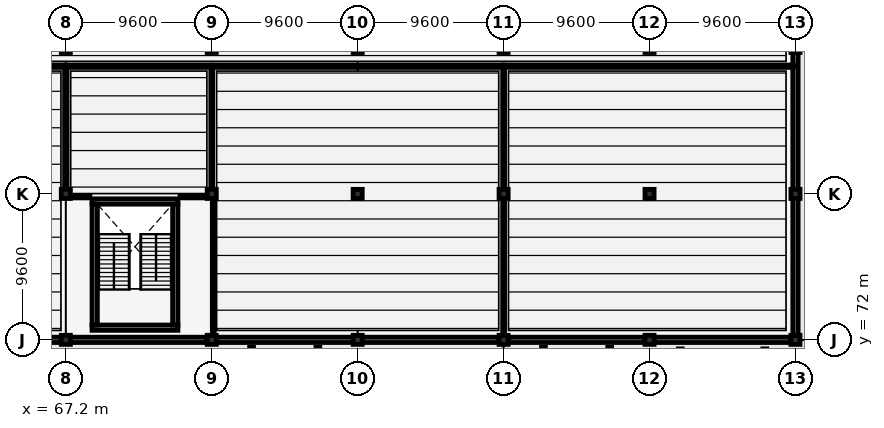
"""IFC4 building model, lengths in metres.
Left out: names, types, materials, properties, quantities, classifications, styles, units other than length and angle.
Written with IfcOpenShell. Run it as: python <this file> out.ifc"""

import sys

from ifc_helpers import new_model, si_unit, direction, frame, frame_2d, origin, origin_2d, place, context, subcontext, project, spatial, rectangle, hollow_rectangle, extrude, element, fill, save


model = new_model("IFC4")
c1 = context("Model", 3, precision=1e-05, world=origin(), true_north=direction((0.0, 1.0)))
c2 = subcontext(c1, "Body", "Model", "MODEL_VIEW")
j1 = project(units=[si_unit("LENGTHUNIT", "METRE"), si_unit("PLANEANGLEUNIT", "RADIAN")], contexts=[c1])
p1 = place(None, origin())
s1 = spatial("IfcSite", under=j1, at=p1, CompositionType="ELEMENT")
p2 = place(p1, origin())
s2 = spatial("IfcBuilding", under=s1, at=p2, CompositionType="ELEMENT")
p3 = place(p2, origin())
s3 = spatial("IfcBuildingStorey", under=s2, at=p3, CompositionType="ELEMENT", Elevation=0.0)
for number, where, z_axis, x_axis in (
    (1, (67.2, 72.0, 0.0), (0.0, 0.0, 1.0), (1.0, 0.0, 0.0)),
    (2, (67.2, 81.6, 0.0), (0.0, 0.0, 1.0), (1.0, 0.0, 0.0)),
    (3, (76.8, 72.0, 0.0), (0.0, 0.0, 1.0), (1.0, 0.0, 0.0)),
    (4, (76.8, 81.6, 0.0), (0.0, 0.0, 1.0), (1.0, 0.0, 0.0)),
    (5, (86.4, 72.0, 0.0), (0.0, 0.0, 1.0), (1.0, 0.0, 0.0)),
    (6, (86.4, 81.6, 0.0), (0.0, 0.0, 1.0), (1.0, 0.0, 0.0)),
    (7, (96.0, 72.0, 0.0), (0.0, 0.0, 1.0), (1.0, 0.0, 0.0)),
    (8, (96.0, 81.6, 0.0), (0.0, 0.0, 1.0), (1.0, 0.0, 0.0)),
    (9, (105.6, 72.0, 0.0), (0.0, 0.0, 1.0), (1.0, 0.0, 0.0)),
    (10, (105.6, 81.6, 0.0), (0.0, 0.0, 1.0), (1.0, 0.0, 0.0)),
    (11, (115.2, 72.0, 0.0), (0.0, 0.0, 1.0), (1.0, 0.0, 0.0)),
    (12, (115.2, 81.6, 0.0), (0.0, 0.0, 1.0), (1.0, 0.0, 0.0)),
):
    element("IfcColumn", number, at=place(p3, frame(where, z_axis=z_axis, x_axis=x_axis)), inside=s3, PredefinedType="COLUMN", context=c2, shape_type="SweptSolid", body=[
        extrude(rectangle(XDim=0.6, YDim=0.6, at=origin_2d()), origin(), (0.0, 0.0, 1.0), 4.8),
    ])
p4 = place(p3, frame((57.9, 72.0, 0.0), z_axis=(0.0, 0.0, 1.0), x_axis=(1.0, 0.0, 0.0)))
e13 = element("IfcWall", 13, at=p4, inside=s3, PredefinedType="SOLIDWALL", context=c2, shape_type="SweptSolid", body=[
    extrude(rectangle(XDim=9.0, YDim=0.35, at=frame_2d((4.5, 0.0))), origin(), (0.0, 0.0, 1.0), 4.1),
])
p5 = place(p4, frame((5.4, 0.0, 1.1)))
e14 = element("IfcOpeningElement", 14, at=p5, cuts=e13, PredefinedType="OPENING", context=c2, shape_type="SweptSolid", body=[
    extrude(rectangle(XDim=1.46, YDim=1.57, at=frame_2d((0.73, 0.785))), frame((0.0, 0.185, 0.0), z_axis=(0.0, -1.0, 0.0), x_axis=(1.0, 0.0, 0.0)), (0.0, 0.0, 1.0), 0.37),
])
p6 = place(p3, frame((67.5, 72.0, 0.0), z_axis=(0.0, 0.0, 1.0), x_axis=(1.0, 0.0, 0.0)))
e15 = element("IfcWall", 15, at=p6, inside=s3, PredefinedType="SOLIDWALL", context=c2, shape_type="SweptSolid", body=[
    extrude(rectangle(XDim=9.0, YDim=0.35, at=frame_2d((4.5, 0.0))), origin(), (0.0, 0.0, 1.0), 4.1),
])
p7 = place(p6, frame((1.4, 0.0, 0.0)))
e16 = element("IfcOpeningElement", 16, at=p7, cuts=e15, PredefinedType="OPENING", context=c2, shape_type="SweptSolid", body=[
    extrude(rectangle(XDim=1.92, YDim=2.34, at=frame_2d((0.96, 1.17))), frame((0.0, 0.185, 0.0), z_axis=(0.0, -1.0, 0.0), x_axis=(1.0, 0.0, 0.0)), (0.0, 0.0, 1.0), 0.37),
])
p8 = place(p6, frame((5.4, 0.0, 1.1)))
e17 = element("IfcOpeningElement", 17, at=p8, cuts=e15, PredefinedType="OPENING", context=c2, shape_type="SweptSolid", body=[
    extrude(rectangle(XDim=1.38, YDim=1.51, at=frame_2d((0.69, 0.755))), frame((0.0, 0.185, 0.0), z_axis=(0.0, -1.0, 0.0), x_axis=(1.0, 0.0, 0.0)), (0.0, 0.0, 1.0), 0.37),
])
p9 = place(p3, frame((77.1, 72.0, 0.0), z_axis=(0.0, 0.0, 1.0), x_axis=(1.0, 0.0, 0.0)))
e18 = element("IfcWall", 18, at=p9, inside=s3, PredefinedType="SOLIDWALL", context=c2, shape_type="SweptSolid", body=[
    extrude(rectangle(XDim=9.0, YDim=0.35, at=frame_2d((4.5, 0.0))), origin(), (0.0, 0.0, 1.0), 4.1),
])
p10 = place(p9, frame((5.4, 0.0, 1.1)))
e19 = element("IfcOpeningElement", 19, at=p10, cuts=e18, PredefinedType="OPENING", context=c2, shape_type="SweptSolid", body=[
    extrude(rectangle(XDim=1.46, YDim=1.57, at=frame_2d((0.73, 0.785))), frame((0.0, 0.185, 0.0), z_axis=(0.0, -1.0, 0.0), x_axis=(1.0, 0.0, 0.0)), (0.0, 0.0, 1.0), 0.37),
])
p11 = place(p3, frame((86.7, 72.0, 0.0), z_axis=(0.0, 0.0, 1.0), x_axis=(1.0, 0.0, 0.0)))
e20 = element("IfcWall", 20, at=p11, inside=s3, PredefinedType="SOLIDWALL", context=c2, shape_type="SweptSolid", body=[
    extrude(rectangle(XDim=9.0, YDim=0.35, at=frame_2d((4.5, 0.0))), origin(), (0.0, 0.0, 1.0), 4.1),
])
p12 = place(p11, frame((1.4, 0.0, 0.0)))
e21 = element("IfcOpeningElement", 21, at=p12, cuts=e20, PredefinedType="OPENING", context=c2, shape_type="SweptSolid", body=[
    extrude(rectangle(XDim=2.0, YDim=2.4, at=frame_2d((1.0, 1.2))), frame((0.0, 0.185, 0.0), z_axis=(0.0, -1.0, 0.0), x_axis=(1.0, 0.0, 0.0)), (0.0, 0.0, 1.0), 0.37),
])
p13 = place(p11, frame((5.4, 0.0, 1.1)))
e22 = element("IfcOpeningElement", 22, at=p13, cuts=e20, PredefinedType="OPENING", context=c2, shape_type="SweptSolid", body=[
    extrude(rectangle(XDim=1.38, YDim=1.51, at=frame_2d((0.69, 0.755))), frame((0.0, 0.185, 0.0), z_axis=(0.0, -1.0, 0.0), x_axis=(1.0, 0.0, 0.0)), (0.0, 0.0, 1.0), 0.37),
])
p14 = place(p3, frame((96.3, 72.0, 0.0), z_axis=(0.0, 0.0, 1.0), x_axis=(1.0, 0.0, 0.0)))
e23 = element("IfcWall", 23, at=p14, inside=s3, PredefinedType="SOLIDWALL", context=c2, shape_type="SweptSolid", body=[
    extrude(rectangle(XDim=9.0, YDim=0.35, at=frame_2d((4.5, 0.0))), origin(), (0.0, 0.0, 1.0), 4.1),
])
p15 = place(p14, frame((5.4, 0.0, 1.1)))
e24 = element("IfcOpeningElement", 24, at=p15, cuts=e23, PredefinedType="OPENING", context=c2, shape_type="SweptSolid", body=[
    extrude(rectangle(XDim=1.46, YDim=1.57, at=frame_2d((0.73, 0.785))), frame((0.0, 0.185, 0.0), z_axis=(0.0, -1.0, 0.0), x_axis=(1.0, 0.0, 0.0)), (0.0, 0.0, 1.0), 0.37),
])
p16 = place(p3, frame((105.9, 72.0, 0.0), z_axis=(0.0, 0.0, 1.0), x_axis=(1.0, 0.0, 0.0)))
e25 = element("IfcWall", 25, at=p16, inside=s3, PredefinedType="SOLIDWALL", context=c2, shape_type="SweptSolid", body=[
    extrude(rectangle(XDim=9.0, YDim=0.35, at=frame_2d((4.5, 0.0))), origin(), (0.0, 0.0, 1.0), 4.1),
])
p17 = place(p16, frame((1.4, 0.0, 0.0)))
e26 = element("IfcOpeningElement", 26, at=p17, cuts=e25, PredefinedType="OPENING", context=c2, shape_type="SweptSolid", body=[
    extrude(rectangle(XDim=1.92, YDim=2.34, at=frame_2d((0.96, 1.17))), frame((0.0, 0.185, 0.0), z_axis=(0.0, -1.0, 0.0), x_axis=(1.0, 0.0, 0.0)), (0.0, 0.0, 1.0), 0.37),
])
p18 = place(p16, frame((5.4, 0.0, 1.1)))
e27 = element("IfcOpeningElement", 27, at=p18, cuts=e25, PredefinedType="OPENING", context=c2, shape_type="SweptSolid", body=[
    extrude(rectangle(XDim=1.38, YDim=1.51, at=frame_2d((0.69, 0.755))), frame((0.0, 0.185, 0.0), z_axis=(0.0, -1.0, 0.0), x_axis=(1.0, 0.0, 0.0)), (0.0, 0.0, 1.0), 0.37),
])
p19 = place(p3, frame((115.2, 72.3, 0.0), z_axis=(0.0, 0.0, 1.0), x_axis=(0.0, 1.0, 0.0)))
e28 = element("IfcWall", 28, at=p19, inside=s3, PredefinedType="SOLIDWALL", context=c2, shape_type="SweptSolid", body=[
    extrude(rectangle(XDim=9.0, YDim=0.35, at=frame_2d((4.5, 0.0))), origin(), (0.0, 0.0, 1.0), 4.1),
])
p20 = place(p19, frame((2.8, 0.0, 1.15)))
e29 = element("IfcOpeningElement", 29, at=p20, cuts=e28, PredefinedType="OPENING", context=c2, shape_type="SweptSolid", body=[
    extrude(rectangle(XDim=1.42, YDim=1.54, at=frame_2d((0.71, 0.77))), frame((0.0, 0.185, 0.0), z_axis=(0.0, -1.0, 0.0), x_axis=(1.0, 0.0, 0.0)), (0.0, 0.0, 1.0), 0.37),
])
p21 = place(p3, frame((115.2, 81.9, 0.0), z_axis=(0.0, 0.0, 1.0), x_axis=(0.0, 1.0, 0.0)))
e30 = element("IfcWall", 30, at=p21, inside=s3, PredefinedType="SOLIDWALL", context=c2, shape_type="SweptSolid", body=[
    extrude(rectangle(XDim=9.0, YDim=0.35, at=frame_2d((4.5, 0.0))), origin(), (0.0, 0.0, 1.0), 4.1),
])
p22 = place(p21, frame((2.8, 0.0, 1.15)))
e31 = element("IfcOpeningElement", 31, at=p22, cuts=e30, PredefinedType="OPENING", context=c2, shape_type="SweptSolid", body=[
    extrude(rectangle(XDim=1.5, YDim=1.6, at=frame_2d((0.75, 0.8))), frame((0.0, 0.185, 0.0), z_axis=(0.0, -1.0, 0.0), x_axis=(1.0, 0.0, 0.0)), (0.0, 0.0, 1.0), 0.37),
])
for number, where, z_axis, x_axis in (
    (32, (83.78, 71.38, 0.0), (0.0, 0.0, 1.0), (1.0, 0.0, 0.0)),
    (33, (79.42, 71.38, 0.0), (0.0, 0.0, 1.0), (1.0, 0.0, 0.0)),
    (34, (102.98, 71.38, 0.0), (0.0, 0.0, 1.0), (1.0, 0.0, 0.0)),
    (35, (98.62, 71.38, 0.0), (0.0, 0.0, 1.0), (1.0, 0.0, 0.0)),
):
    element("IfcColumn", number, at=place(p3, frame(where, z_axis=z_axis, x_axis=x_axis)), inside=s3, PredefinedType="COLUMN", context=c2, shape_type="SweptSolid", body=[
        extrude(hollow_rectangle(XDim=0.254, YDim=0.254, WallThickness=0.012, at=origin_2d()), origin(), (0.0, 0.0, 1.0), 3.47),
    ])
for number, where, z_axis, x_axis in (
    (36, (113.18, 71.28, 0.0), (0.0, 0.0, 1.0), (1.0, 0.0, 0.0)),
    (37, (107.62, 71.28, 0.0), (0.0, 0.0, 1.0), (1.0, 0.0, 0.0)),
):
    element("IfcColumn", number, at=place(p3, frame(where, z_axis=z_axis, x_axis=x_axis)), inside=s3, PredefinedType="COLUMN", context=c2, shape_type="SweptSolid", body=[
        extrude(hollow_rectangle(XDim=0.254, YDim=0.254, WallThickness=0.012, at=origin_2d()), origin(), (0.0, 0.0, 1.0), 3.56),
    ])
for number, where, z_axis, x_axis in (
    (38, (74.575, 72.8, 0.0), (0.0, 0.0, 1.0), (-1.0, 0.0, 0.0)),
    (39, (68.925, 81.1, 0.0), (0.0, 0.0, 1.0), (1.0, 0.0, 0.0)),
):
    element("IfcWall", number, at=place(p3, frame(where, z_axis=z_axis, x_axis=x_axis)), inside=s3, PredefinedType="SHEAR", context=c2, shape_type="SweptSolid", body=[
        extrude(rectangle(XDim=5.65, YDim=0.35, at=frame_2d((2.825, 0.0))), origin(), (0.0, 0.0, 1.0), 4.55),
    ])
p23 = place(p3, frame((69.1, 72.975, 0.0), z_axis=(0.0, 0.0, 1.0), x_axis=(0.0, 1.0, 0.0)))
e40 = element("IfcWall", 40, at=p23, inside=s3, PredefinedType="SHEAR", context=c2, shape_type="SweptSolid", body=[
    extrude(rectangle(XDim=7.95, YDim=0.35, at=frame_2d((3.975, 0.0))), origin(), (0.0, 0.0, 1.0), 4.55),
])
p24 = place(p3, frame((74.4, 80.925, 0.0), z_axis=(0.0, 0.0, 1.0), x_axis=(0.0, -1.0, 0.0)))
e41 = element("IfcWall", 41, at=p24, inside=s3, PredefinedType="SHEAR", context=c2, shape_type="SweptSolid", body=[
    extrude(rectangle(XDim=7.95, YDim=0.35, at=frame_2d((3.975, 0.0))), origin(), (0.0, 0.0, 1.0), 4.55),
])
p25 = place(p24, frame((5.68, 0.0, 0.0)))
e42 = element("IfcOpeningElement", 42, at=p25, cuts=e41, PredefinedType="OPENING", context=c2, shape_type="SweptSolid", body=[
    extrude(rectangle(XDim=2.05, YDim=2.15, at=frame_2d((1.025, 1.075))), frame((0.0, 0.185, 0.0), z_axis=(0.0, -1.0, 0.0), x_axis=(1.0, 0.0, 0.0)), (0.0, 0.0, 1.0), 0.37),
])
p26 = place(p3, frame((67.2, 81.4, 0.0), z_axis=(0.0, 0.0, 1.0), x_axis=(0.0, 1.0, 0.0)))
e43 = element("IfcWall", 43, at=p26, inside=s3, PredefinedType="PARTITIONING", context=c2, shape_type="SweptSolid", body=[
    extrude(rectangle(XDim=8.5, YDim=0.16, at=frame_2d((4.25, 0.0))), origin(), (0.0, 0.0, 1.0), 3.92),
])
p27 = place(p26, frame((3.675, 0.0, 0.0)))
e44 = element("IfcOpeningElement", 44, at=p27, cuts=e43, PredefinedType="OPENING", context=c2, shape_type="SweptSolid", body=[
    extrude(rectangle(XDim=1.15, YDim=2.2, at=frame_2d((0.575, 1.1))), frame((0.0, 0.09, 0.0), z_axis=(0.0, -1.0, 0.0), x_axis=(1.0, 0.0, 0.0)), (0.0, 0.0, 1.0), 0.18),
])
p28 = place(p3, frame((55.8, 90.0, 0.0), z_axis=(0.0, 0.0, 1.0), x_axis=(1.0, 0.0, 0.0)))
e45 = element("IfcWall", 45, at=p28, inside=s3, PredefinedType="PARTITIONING", context=c2, shape_type="SweptSolid", body=[
    extrude(rectangle(XDim=11.3, YDim=0.16, at=frame_2d((5.65, 0.0))), origin(), (0.0, 0.0, 1.0), 4.42),
])
p29 = place(p28, frame((4.75, 0.0, 0.0)))
e46 = element("IfcOpeningElement", 46, at=p29, cuts=e45, PredefinedType="OPENING", context=c2, shape_type="SweptSolid", body=[
    extrude(rectangle(XDim=1.8, YDim=2.15, at=frame_2d((0.9, 1.075))), frame((0.0, 0.09, 0.0), z_axis=(0.0, -1.0, 0.0), x_axis=(1.0, 0.0, 0.0)), (0.0, 0.0, 1.0), 0.18),
])
p30 = place(p3, frame((76.8, 81.4, 0.0), z_axis=(0.0, 0.0, 1.0), x_axis=(0.0, 1.0, 0.0)))
e47 = element("IfcWall", 47, at=p30, inside=s3, PredefinedType="PARTITIONING", context=c2, shape_type="SweptSolid", body=[
    extrude(rectangle(XDim=8.5, YDim=0.125, at=frame_2d((4.25, 0.0))), origin(), (0.0, 0.0, 1.0), 3.92),
])
p31 = place(p3, frame((67.3, 90.0, 0.0), z_axis=(0.0, 0.0, 1.0), x_axis=(1.0, 0.0, 0.0)))
e48 = element("IfcWall", 48, at=p31, inside=s3, PredefinedType="PARTITIONING", context=c2, shape_type="SweptSolid", body=[
    extrude(rectangle(XDim=9.4, YDim=0.16, at=frame_2d((4.7, 0.0))), origin(), (0.0, 0.0, 1.0), 4.42),
])
p32 = place(p31, frame((4.125, 0.0, 0.0)))
e49 = element("IfcOpeningElement", 49, at=p32, cuts=e48, PredefinedType="OPENING", context=c2, shape_type="SweptSolid", body=[
    extrude(rectangle(XDim=1.15, YDim=2.2, at=frame_2d((0.575, 1.1))), frame((0.0, 0.09, 0.0), z_axis=(0.0, -1.0, 0.0), x_axis=(1.0, 0.0, 0.0)), (0.0, 0.0, 1.0), 0.18),
])
p33 = place(p3, frame((96.0, 72.05, 0.0), z_axis=(0.0, 0.0, 1.0), x_axis=(0.0, 1.0, 0.0)))
e50 = element("IfcWall", 50, at=p33, inside=s3, PredefinedType="PARTITIONING", context=c2, shape_type="SweptSolid", body=[
    extrude(rectangle(XDim=17.85, YDim=0.125, at=frame_2d((8.925, 0.0))), origin(), (0.0, 0.0, 1.0), 3.92),
])
p34 = place(p3, frame((76.9, 90.0, 0.0), z_axis=(0.0, 0.0, 1.0), x_axis=(1.0, 0.0, 0.0)))
e51 = element("IfcWall", 51, at=p34, inside=s3, PredefinedType="PARTITIONING", context=c2, shape_type="SweptSolid", body=[
    extrude(rectangle(XDim=19.05, YDim=0.16, at=frame_2d((9.525, 0.0))), origin(), (0.0, 0.0, 1.0), 4.42),
])
p35 = place(p34, frame((6.373, 0.0, 0.0)))
e52 = element("IfcOpeningElement", 52, at=p35, cuts=e51, PredefinedType="OPENING", context=c2, shape_type="SweptSolid", body=[
    extrude(rectangle(XDim=1.15, YDim=2.2, at=frame_2d((0.575, 1.1))), frame((0.0, 0.09, 0.0), z_axis=(0.0, -1.0, 0.0), x_axis=(1.0, 0.0, 0.0)), (0.0, 0.0, 1.0), 0.18),
])
p36 = place(p3, frame((96.03, 90.0, 0.0), z_axis=(0.0, 0.0, 1.0), x_axis=(1.0, 0.0, 0.0)))
e53 = element("IfcWall", 53, at=p36, inside=s3, PredefinedType="PARTITIONING", context=c2, shape_type="SweptSolid", body=[
    extrude(rectangle(XDim=19.12, YDim=0.16, at=frame_2d((9.56, 0.0))), origin(), (0.0, 0.0, 1.0), 4.42),
])
p37 = place(p36, frame((11.572, 0.0, 0.0)))
e54 = element("IfcOpeningElement", 54, at=p37, cuts=e53, PredefinedType="OPENING", context=c2, shape_type="SweptSolid", body=[
    extrude(rectangle(XDim=1.15, YDim=2.2, at=frame_2d((0.575, 1.1))), frame((0.0, 0.09, 0.0), z_axis=(0.0, -1.0, 0.0), x_axis=(1.0, 0.0, 0.0)), (0.0, 0.0, 1.0), 0.18),
])
p38 = place(p3, frame((67.44, 81.4, 0.0), z_axis=(0.0, 0.0, 1.0), x_axis=(1.0, 0.0, 0.0)))
e55 = element("IfcWall", 55, at=p38, inside=s3, PredefinedType="PARTITIONING", context=c2, shape_type="SweptSolid", body=[
    extrude(rectangle(XDim=1.345, YDim=0.125, at=frame_2d((0.672, 0.0))), origin(), (0.0, 0.0, 1.0), 3.841),
])
p39 = place(p3, frame((74.715, 81.4, 0.0), z_axis=(0.0, 0.0, 1.0), x_axis=(1.0, 0.0, 0.0)))
e56 = element("IfcWall", 56, at=p39, inside=s3, PredefinedType="PARTITIONING", context=c2, shape_type="SweptSolid", body=[
    extrude(rectangle(XDim=1.845, YDim=0.125, at=frame_2d((0.922, 0.0))), origin(), (0.0, 0.0, 1.0), 3.841),
])
p40 = place(p3, frame((76.9, 72.05, 0.0), z_axis=(0.0, 0.0, 1.0), x_axis=(0.0, 1.0, 0.0)))
e57 = element("IfcWall", 57, at=p40, inside=s3, PredefinedType="PARTITIONING", context=c2, shape_type="SweptSolid", body=[
    extrude(rectangle(XDim=9.21, YDim=0.125, at=frame_2d((4.605, 0.0))), origin(), (0.0, 0.0, 1.0), 3.92),
])
p41 = place(p7, origin())
e58 = element("IfcDoor", 58, at=p41, inside=s3, OperationType="DOUBLE_DOOR_SINGLE_SWING", PredefinedType="DOOR", context=c2, shape_type="SweptSolid", body=[
    extrude(rectangle(XDim=1.92, YDim=2.34, at=frame_2d((0.96, 1.17))), frame((0.0, 0.025, 0.0), z_axis=(0.0, -1.0, 0.0), x_axis=(1.0, 0.0, 0.0)), (0.0, 0.0, 1.0), 0.05),
])
fill(e16, e58)
p42 = place(p8, origin())
e59 = element("IfcWindow", 59, at=p42, inside=s3, PartitioningType="SINGLE_PANEL", PredefinedType="WINDOW", context=c2, shape_type="SweptSolid", body=[
    extrude(rectangle(XDim=1.38, YDim=1.51, at=frame_2d((0.69, 0.755))), frame((0.0, 0.03, 0.0), z_axis=(0.0, -1.0, 0.0), x_axis=(1.0, 0.0, 0.0)), (0.0, 0.0, 1.0), 0.06),
])
fill(e17, e59)
p43 = place(p10, origin())
e60 = element("IfcWindow", 60, at=p43, inside=s3, PartitioningType="SINGLE_PANEL", PredefinedType="WINDOW", context=c2, shape_type="SweptSolid", body=[
    extrude(rectangle(XDim=1.46, YDim=1.57, at=frame_2d((0.73, 0.785))), frame((0.0, 0.03, 0.0), z_axis=(0.0, -1.0, 0.0), x_axis=(1.0, 0.0, 0.0)), (0.0, 0.0, 1.0), 0.06),
])
fill(e19, e60)
p44 = place(p12, origin())
e61 = element("IfcDoor", 61, at=p44, inside=s3, OperationType="DOUBLE_DOOR_SINGLE_SWING", PredefinedType="DOOR", context=c2, shape_type="SweptSolid", body=[
    extrude(rectangle(XDim=2.0, YDim=2.4, at=frame_2d((1.0, 1.2))), frame((0.0, 0.025, 0.0), z_axis=(0.0, -1.0, 0.0), x_axis=(1.0, 0.0, 0.0)), (0.0, 0.0, 1.0), 0.05),
])
fill(e21, e61)
p45 = place(p13, origin())
e62 = element("IfcWindow", 62, at=p45, inside=s3, PartitioningType="SINGLE_PANEL", PredefinedType="WINDOW", context=c2, shape_type="SweptSolid", body=[
    extrude(rectangle(XDim=1.38, YDim=1.51, at=frame_2d((0.69, 0.755))), frame((0.0, 0.03, 0.0), z_axis=(0.0, -1.0, 0.0), x_axis=(1.0, 0.0, 0.0)), (0.0, 0.0, 1.0), 0.06),
])
fill(e22, e62)
p46 = place(p15, origin())
e63 = element("IfcWindow", 63, at=p46, inside=s3, PartitioningType="SINGLE_PANEL", PredefinedType="WINDOW", context=c2, shape_type="SweptSolid", body=[
    extrude(rectangle(XDim=1.46, YDim=1.57, at=frame_2d((0.73, 0.785))), frame((0.0, 0.03, 0.0), z_axis=(0.0, -1.0, 0.0), x_axis=(1.0, 0.0, 0.0)), (0.0, 0.0, 1.0), 0.06),
])
fill(e24, e63)
p47 = place(p17, origin())
e64 = element("IfcDoor", 64, at=p47, inside=s3, OperationType="DOUBLE_DOOR_SINGLE_SWING", PredefinedType="DOOR", context=c2, shape_type="SweptSolid", body=[
    extrude(rectangle(XDim=1.92, YDim=2.34, at=frame_2d((0.96, 1.17))), frame((0.0, 0.025, 0.0), z_axis=(0.0, -1.0, 0.0), x_axis=(1.0, 0.0, 0.0)), (0.0, 0.0, 1.0), 0.05),
])
fill(e26, e64)
p48 = place(p18, origin())
e65 = element("IfcWindow", 65, at=p48, inside=s3, PartitioningType="SINGLE_PANEL", PredefinedType="WINDOW", context=c2, shape_type="SweptSolid", body=[
    extrude(rectangle(XDim=1.38, YDim=1.51, at=frame_2d((0.69, 0.755))), frame((0.0, 0.03, 0.0), z_axis=(0.0, -1.0, 0.0), x_axis=(1.0, 0.0, 0.0)), (0.0, 0.0, 1.0), 0.06),
])
fill(e27, e65)
p49 = place(p20, origin())
e66 = element("IfcWindow", 66, at=p49, inside=s3, PartitioningType="SINGLE_PANEL", PredefinedType="WINDOW", context=c2, shape_type="SweptSolid", body=[
    extrude(rectangle(XDim=1.42, YDim=1.54, at=frame_2d((0.71, 0.77))), frame((0.0, 0.03, 0.0), z_axis=(0.0, -1.0, 0.0), x_axis=(1.0, 0.0, 0.0)), (0.0, 0.0, 1.0), 0.06),
])
fill(e29, e66)
p50 = place(p22, origin())
e67 = element("IfcWindow", 67, at=p50, inside=s3, PartitioningType="SINGLE_PANEL", PredefinedType="WINDOW", context=c2, shape_type="SweptSolid", body=[
    extrude(rectangle(XDim=1.5, YDim=1.6, at=frame_2d((0.75, 0.8))), frame((0.0, 0.03, 0.0), z_axis=(0.0, -1.0, 0.0), x_axis=(1.0, 0.0, 0.0)), (0.0, 0.0, 1.0), 0.06),
])
fill(e31, e67)
p51 = place(p25, origin())
e68 = element("IfcDoor", 68, at=p51, inside=s3, OperationType="DOUBLE_DOOR_SINGLE_SWING", PredefinedType="DOOR", context=c2, shape_type="SweptSolid", body=[
    extrude(rectangle(XDim=2.05, YDim=2.15, at=frame_2d((1.025, 1.075))), frame((0.0, 0.025, 0.0), z_axis=(0.0, -1.0, 0.0), x_axis=(1.0, 0.0, 0.0)), (0.0, 0.0, 1.0), 0.05),
])
fill(e42, e68)
p52 = place(p27, origin())
e69 = element("IfcDoor", 69, at=p52, inside=s3, OperationType="SINGLE_SWING_LEFT", PredefinedType="DOOR", context=c2, shape_type="SweptSolid", body=[
    extrude(rectangle(XDim=1.15, YDim=2.2, at=frame_2d((0.575, 1.1))), frame((0.0, 0.025, 0.0), z_axis=(0.0, -1.0, 0.0), x_axis=(1.0, 0.0, 0.0)), (0.0, 0.0, 1.0), 0.05),
])
fill(e44, e69)
p53 = place(p32, origin())
e70 = element("IfcDoor", 70, at=p53, inside=s3, OperationType="SINGLE_SWING_LEFT", PredefinedType="DOOR", context=c2, shape_type="SweptSolid", body=[
    extrude(rectangle(XDim=1.15, YDim=2.2, at=frame_2d((0.575, 1.1))), frame((0.0, 0.025, 0.0), z_axis=(0.0, -1.0, 0.0), x_axis=(1.0, 0.0, 0.0)), (0.0, 0.0, 1.0), 0.05),
])
fill(e49, e70)
p54 = place(p35, origin())
e71 = element("IfcDoor", 71, at=p54, inside=s3, OperationType="SINGLE_SWING_RIGHT", PredefinedType="DOOR", context=c2, shape_type="SweptSolid", body=[
    extrude(rectangle(XDim=1.15, YDim=2.2, at=frame_2d((0.575, 1.1))), frame((0.0, 0.025, 0.0), z_axis=(0.0, -1.0, 0.0), x_axis=(1.0, 0.0, 0.0)), (0.0, 0.0, 1.0), 0.05),
])
fill(e52, e71)
p55 = place(p37, origin())
e72 = element("IfcDoor", 72, at=p55, inside=s3, OperationType="SINGLE_SWING_LEFT", PredefinedType="DOOR", context=c2, shape_type="SweptSolid", body=[
    extrude(rectangle(XDim=1.15, YDim=2.2, at=frame_2d((0.575, 1.1))), frame((0.0, 0.025, 0.0), z_axis=(0.0, -1.0, 0.0), x_axis=(1.0, 0.0, 0.0)), (0.0, 0.0, 1.0), 0.05),
])
fill(e54, e72)
save(model, sys.argv[1])
